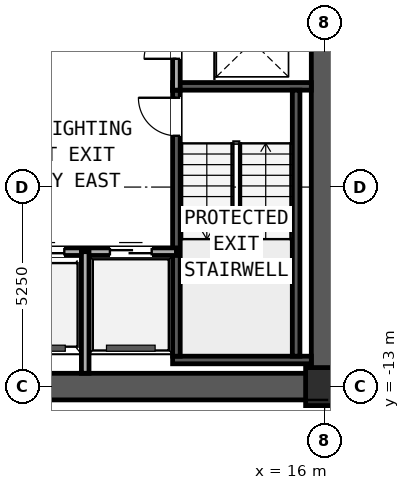
"""IFC4 building model, lengths in metres.
Left out: names, types, materials, properties, quantities, classifications, styles, units other than length and angle.
Written with IfcOpenShell. Run it as: python <this file> out.ifc"""

import sys

from ifc_helpers import new_model, si_unit, direction, frame, frame_2d, origin, origin_2d, place, context, subcontext, project, spatial, rectangle, extrude, element, fill, save


model = new_model("IFC4")
c1 = context("Model", 3, precision=1e-05, world=origin(), true_north=direction((0.0, 1.0)))
c2 = subcontext(c1, "Body", "Model", "MODEL_VIEW")
j1 = project(units=[si_unit("LENGTHUNIT", "METRE"), si_unit("PLANEANGLEUNIT", "RADIAN")], contexts=[c1])
p1 = place(None, origin())
s1 = spatial("IfcSite", under=j1, at=p1, CompositionType="ELEMENT")
p2 = place(p1, origin())
s2 = spatial("IfcBuilding", under=s1, at=p2, CompositionType="ELEMENT")
p3 = place(p2, frame((0.0, 0.0, 146.25)))
s3 = spatial("IfcBuildingStorey", under=s2, at=p3, CompositionType="ELEMENT", Elevation=146.25)
p4 = place(p3, frame((-16.35, -13.0, 0.0), z_axis=(0.0, 0.0, 1.0), x_axis=(1.0, 0.0, 0.0)))
e1 = element("IfcWall", 1, at=p4, inside=s3, PredefinedType="SHEAR", context=c2, shape_type="SweptSolid", body=[
    extrude(rectangle(XDim=32.7, YDim=0.7, at=frame_2d((16.35, 0.0))), origin(), (0.0, 0.0, 1.0), 2.91),
])
p5 = place(p3, frame((16.0, -12.65, 0.0), z_axis=(0.0, 0.0, 1.0), x_axis=(0.0, 1.0, 0.0)))
e2 = element("IfcWall", 2, at=p5, inside=s3, PredefinedType="SHEAR", context=c2, shape_type="SweptSolid", body=[
    extrude(rectangle(XDim=9.8, YDim=0.7, at=frame_2d((4.9, 0.0))), origin(), (0.0, 0.0, 1.0), 2.91),
])
for number, where, z_axis, x_axis in (
    (3, (12.0, -12.3, 0.0), (0.0, 0.0, 1.0), (1.0, 0.0, 0.0)),
    (4, (12.0, -5.1, 0.0), (0.0, 0.0, 1.0), (1.0, 0.0, 0.0)),
):
    element("IfcWall", number, at=place(p3, frame(where, z_axis=z_axis, x_axis=x_axis)), inside=s3, PredefinedType="SOLIDWALL", context=c2, shape_type="SweptSolid", body=[
        extrude(rectangle(XDim=3.65, YDim=0.2, at=frame_2d((1.825, 0.0))), origin(), (0.0, 0.0, 1.0), 3.19),
    ])
p6 = place(p3, frame((12.1, -12.2, 0.0), z_axis=(0.0, 0.0, 1.0), x_axis=(0.0, 1.0, 0.0)))
e5 = element("IfcWall", 5, at=p6, inside=s3, PredefinedType="SOLIDWALL", context=c2, shape_type="SweptSolid", body=[
    extrude(rectangle(XDim=7.0, YDim=0.2, at=frame_2d((3.5, 0.0))), origin(), (0.0, 0.0, 1.0), 3.19),
])
p7 = place(p6, frame((5.8, 0.0, 0.0)))
e6 = element("IfcOpeningElement", 6, at=p7, cuts=e5, PredefinedType="OPENING", context=c2, shape_type="SweptSolid", body=[
    extrude(rectangle(XDim=1.0, YDim=2.1, at=frame_2d((0.5, 1.05))), frame((0.0, 0.11, 0.0), z_axis=(0.0, -1.0, 0.0), x_axis=(1.0, 0.0, 0.0)), (0.0, 0.0, 1.0), 0.22),
])
p8 = place(p3, frame((15.25, -12.2, 0.0), z_axis=(0.0, 0.0, 1.0), x_axis=(0.0, 1.0, 0.0)))
e7 = element("IfcWall", 7, at=p8, inside=s3, PredefinedType="SOLIDWALL", context=c2, shape_type="SweptSolid", body=[
    extrude(rectangle(XDim=7.0, YDim=0.2, at=frame_2d((3.5, 0.0))), origin(), (0.0, 0.0, 1.0), 3.19),
])
p9 = place(p3, frame((16.0, -13.0, 0.0), z_axis=(0.0, 0.0, 1.0), x_axis=(1.0, 0.0, 0.0)))
e8 = element("IfcColumn", 8, at=p9, inside=s3, PredefinedType="COLUMN", context=c2, shape_type="SweptSolid", body=[
    extrude(rectangle(XDim=1.0, YDim=1.0, at=origin_2d()), origin(), (0.0, 0.0, 1.0), 3.45),
])
p10 = place(p3, frame((-26.695, -13.016, 0.0), z_axis=(0.0, 0.0, 1.0), x_axis=(0.995396268366, -0.095845025554, 0.0)))
e9 = element("IfcWall", 9, at=p10, inside=s3, PredefinedType="STANDARD", context=c2, shape_type="SweptSolid", body=[
    extrude(rectangle(XDim=49.6, YDim=0.24, at=frame_2d((24.8, 0.0))), origin(), (0.0, 0.0, 1.0), 3.19),
])
p11 = place(p10, frame((6.044, 0.0, 0.7)))
e10 = element("IfcOpeningElement", 10, at=p11, cuts=e9, PredefinedType="OPENING", context=c2, shape_type="SweptSolid", body=[
    extrude(rectangle(XDim=1.8, YDim=1.5, at=frame_2d((0.9, 0.75))), frame((0.0, 0.13, 0.0), z_axis=(0.0, -1.0, 0.0), x_axis=(1.0, 0.0, 0.0)), (0.0, 0.0, 1.0), 0.26),
])
p12 = place(p10, frame((41.756, 0.0, 0.7)))
e11 = element("IfcOpeningElement", 11, at=p12, cuts=e9, PredefinedType="OPENING", context=c2, shape_type="SweptSolid", body=[
    extrude(rectangle(XDim=1.8, YDim=1.5, at=frame_2d((0.9, 0.75))), frame((0.0, 0.13, 0.0), z_axis=(0.0, -1.0, 0.0), x_axis=(1.0, 0.0, 0.0)), (0.0, 0.0, 1.0), 0.26),
])
p13 = place(p3, frame((12.1, -5.2, 0.0), z_axis=(0.0, 0.0, 1.0), x_axis=(0.0, 1.0, 0.0)))
e12 = element("IfcWall", 12, at=p13, inside=s3, PredefinedType="PARTITIONING", context=c2, shape_type="SweptSolid", body=[
    extrude(rectangle(XDim=2.35, YDim=0.2, at=frame_2d((1.175, 0.0))), origin(), (0.0, 0.0, 1.0), 2.225),
])
p14 = place(p13, frame((0.825, 0.0, 0.0)))
e13 = element("IfcOpeningElement", 13, at=p14, cuts=e12, PredefinedType="OPENING", context=c2, shape_type="SweptSolid", body=[
    extrude(rectangle(XDim=0.85, YDim=2.05, at=frame_2d((0.425, 1.025))), frame((0.0, 0.11, 0.0), z_axis=(0.0, -1.0, 0.0), x_axis=(1.0, 0.0, 0.0)), (0.0, 0.0, 1.0), 0.22),
])
p15 = place(p3, frame((7.4, -9.45, 0.0), z_axis=(0.0, 0.0, 1.0), x_axis=(1.0, 0.0, 0.0)))
e14 = element("IfcWall", 14, at=p15, inside=s3, PredefinedType="PARTITIONING", context=c2, shape_type="SweptSolid", body=[
    extrude(rectangle(XDim=4.7, YDim=0.2, at=frame_2d((2.35, 0.0))), origin(), (0.0, 0.0, 1.0), 3.19),
])
p16 = place(p15, frame((2.95, 0.0, 0.0)))
e15 = element("IfcOpeningElement", 15, at=p16, cuts=e14, PredefinedType="OPENING", context=c2, shape_type="SweptSolid", body=[
    extrude(rectangle(XDim=1.1, YDim=2.2, at=frame_2d((0.55, 1.1))), frame((0.0, 0.11, 0.0), z_axis=(0.0, -1.0, 0.0), x_axis=(1.0, 0.0, 0.0)), (0.0, 0.0, 1.0), 0.22),
])
p17 = place(p15, frame((0.65, 0.0, 0.0)))
e16 = element("IfcOpeningElement", 16, at=p17, cuts=e14, PredefinedType="OPENING", context=c2, shape_type="SweptSolid", body=[
    extrude(rectangle(XDim=1.1, YDim=2.2, at=frame_2d((0.55, 1.1))), frame((0.0, 0.11, 0.0), z_axis=(0.0, -1.0, 0.0), x_axis=(1.0, 0.0, 0.0)), (0.0, 0.0, 1.0), 0.22),
])
p18 = place(p3, frame((9.7, -12.65, 0.0), z_axis=(0.0, 0.0, 1.0), x_axis=(0.0, 1.0, 0.0)))
e17 = element("IfcWall", 17, at=p18, inside=s3, PredefinedType="PARTITIONING", context=c2, shape_type="SweptSolid", body=[
    extrude(rectangle(XDim=3.2, YDim=0.2, at=frame_2d((1.6, 0.0))), origin(), (0.0, 0.0, 1.0), 2.225),
])
p19 = place(p7, origin())
e18 = element("IfcDoor", 18, at=p19, inside=s3, OperationType="SINGLE_SWING_RIGHT", PredefinedType="DOOR", context=c2, shape_type="SweptSolid", body=[
    extrude(rectangle(XDim=1.0, YDim=2.1, at=frame_2d((0.5, 1.05))), frame((0.0, 0.025, 0.0), z_axis=(0.0, -1.0, 0.0), x_axis=(1.0, 0.0, 0.0)), (0.0, 0.0, 1.0), 0.05),
])
fill(e6, e18)
p20 = place(p14, frame((0.85, 0.0, 0.0), z_axis=(0.0, 0.0, 1.0), x_axis=(-1.0, 0.0, 0.0)))
e19 = element("IfcDoor", 19, at=p20, inside=s3, OperationType="SINGLE_SWING_LEFT", PredefinedType="DOOR", context=c2, shape_type="SweptSolid", body=[
    extrude(rectangle(XDim=0.85, YDim=2.05, at=frame_2d((0.425, 1.025))), frame((0.0, 0.025, 0.0), z_axis=(0.0, -1.0, 0.0), x_axis=(1.0, 0.0, 0.0)), (0.0, 0.0, 1.0), 0.05),
])
fill(e13, e19)
p21 = place(p16, origin())
e20 = element("IfcDoor", 20, at=p21, inside=s3, OperationType="SLIDING_TO_LEFT", PredefinedType="DOOR", context=c2, shape_type="SweptSolid", body=[
    extrude(rectangle(XDim=1.1, YDim=2.2, at=frame_2d((0.55, 1.1))), frame((0.0, 0.025, 0.0), z_axis=(0.0, -1.0, 0.0), x_axis=(1.0, 0.0, 0.0)), (0.0, 0.0, 1.0), 0.05),
])
fill(e15, e20)
p22 = place(p17, origin())
e21 = element("IfcDoor", 21, at=p22, inside=s3, OperationType="SLIDING_TO_RIGHT", PredefinedType="DOOR", context=c2, shape_type="SweptSolid", body=[
    extrude(rectangle(XDim=1.1, YDim=2.2, at=frame_2d((0.55, 1.1))), frame((0.0, 0.025, 0.0), z_axis=(0.0, -1.0, 0.0), x_axis=(1.0, 0.0, 0.0)), (0.0, 0.0, 1.0), 0.05),
])
fill(e16, e21)
save(model, sys.argv[1])
